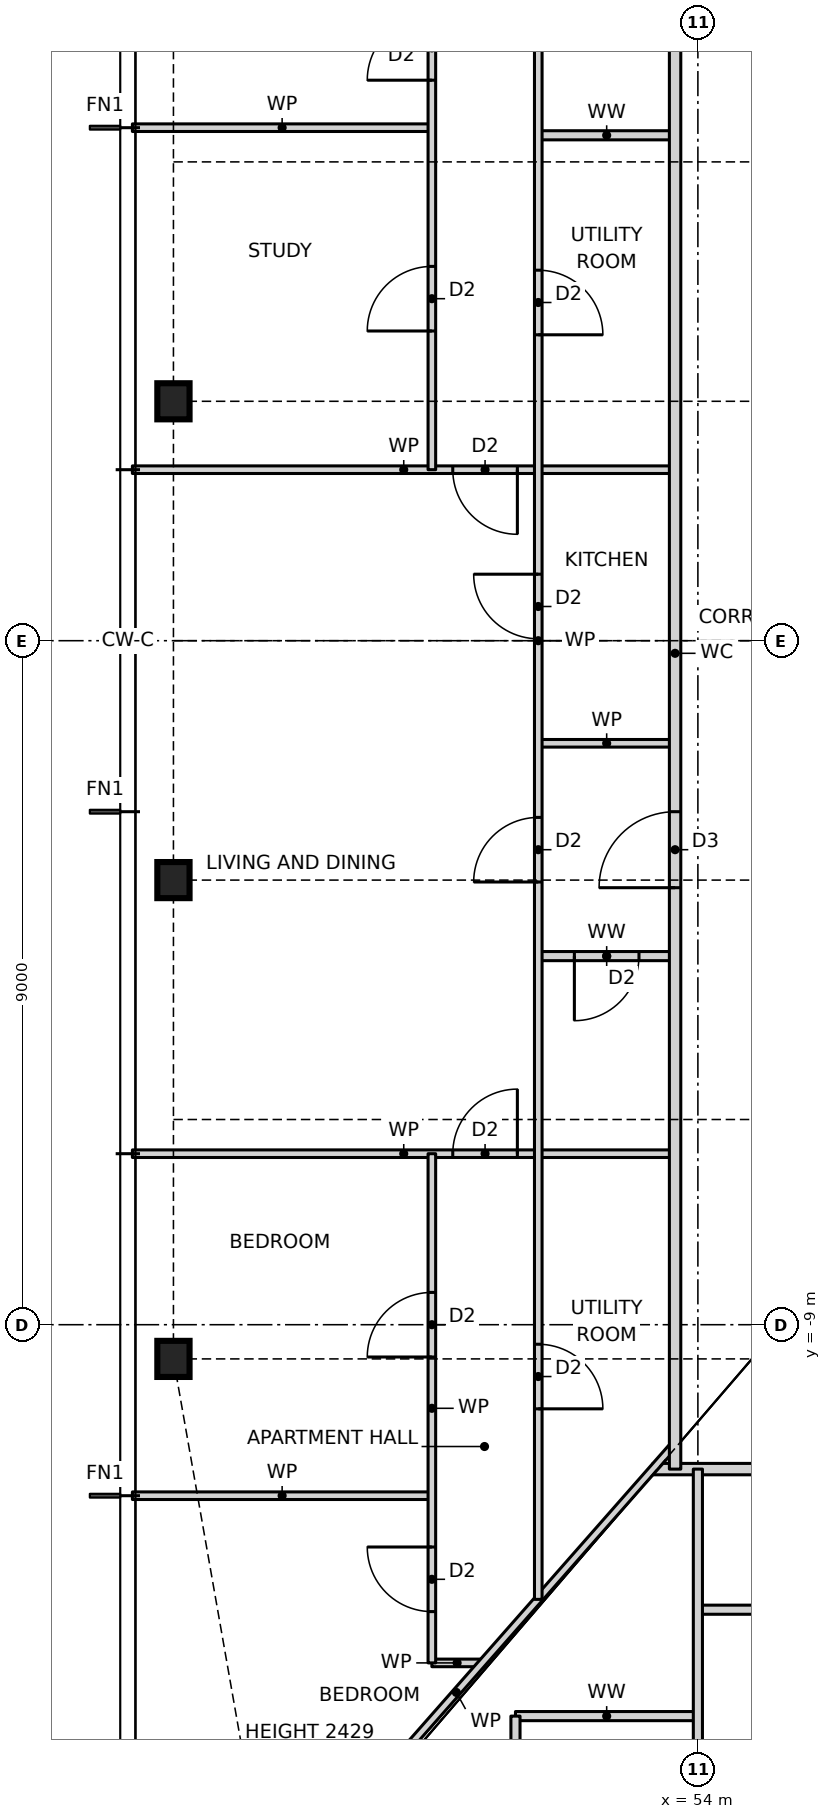
"""IFC4 building model, lengths in metres.
Left out: names, types, materials, properties, quantities, classifications, styles, units other than length and angle.
Written with IfcOpenShell. Run it as: python <this file> out.ifc"""

import sys

from ifc_helpers import new_model, si_unit, direction, frame, frame_2d, origin, origin_2d, place, context, subcontext, project, spatial, rectangle, i_section, extrude, element, fill, save


model = new_model("IFC4")
c1 = context("Model", 3, precision=1e-05, world=origin(), true_north=direction((0.0, 1.0)))
c2 = subcontext(c1, "Body", "Model", "MODEL_VIEW")
j1 = project(units=[si_unit("LENGTHUNIT", "METRE"), si_unit("PLANEANGLEUNIT", "RADIAN")], contexts=[c1])
p1 = place(None, origin())
s1 = spatial("IfcSite", under=j1, at=p1, CompositionType="ELEMENT")
p2 = place(p1, origin())
s2 = spatial("IfcBuilding", under=s1, at=p2, CompositionType="ELEMENT")
p3 = place(p2, frame((0.0, 0.0, 22.0)))
s3 = spatial("IfcBuildingStorey", under=s2, at=p3, CompositionType="ELEMENT", Elevation=22.0)
for number, where, z_axis, x_axis in (
    (1, (47.1, 3.15, 0.0), (0.0, 0.0, 1.0), (1.0, 0.0, 0.0)),
    (2, (47.1, -3.15, 0.0), (0.0, 0.0, 1.0), (1.0, 0.0, 0.0)),
    (3, (47.1, -9.45, 0.0), (0.0, 0.0, 1.0), (1.0, 0.0, 0.0)),
):
    element("IfcColumn", number, at=place(p3, frame(where, z_axis=z_axis, x_axis=x_axis)), inside=s3, PredefinedType="COLUMN", context=c2, shape_type="SweptSolid", body=[
        extrude(i_section(OverallWidth=0.424, OverallDepth=0.475, WebThickness=0.048, FlangeThickness=0.077, at=origin_2d()), origin(), (0.0, 0.0, 1.0), 3.5),
    ])
p4 = place(p3, frame((51.6, -14.15, 0.0), z_axis=(0.0, 0.0, 1.0), x_axis=(1.0, 0.0, 0.0)))
e4 = element("IfcWall", 4, at=p4, inside=s3, PredefinedType="PARTITIONING", context=c2, shape_type="SweptSolid", body=[
    extrude(rectangle(XDim=2.4, YDim=0.12, at=frame_2d((1.2, 0.0))), origin(), (0.0, 0.0, 1.0), 3.27),
])
p5 = place(p3, frame((50.5, -13.45, 0.0), z_axis=(0.0, 0.0, 1.0), x_axis=(1.0, 0.0, 0.0)))
e5 = element("IfcWall", 5, at=p5, inside=s3, PredefinedType="PARTITIONING", context=c2, shape_type="SweptSolid", body=[
    extrude(rectangle(XDim=0.664, YDim=0.1, at=frame_2d((0.332, 0.0))), origin(), (0.0, 0.0, 1.0), 3.27),
])
p6 = place(p3, frame((54.0, -12.75, 0.0), z_axis=(0.0, 0.0, 1.0), x_axis=(1.0, 0.0, 0.0)))
e6 = element("IfcWall", 6, at=p6, inside=s3, PredefinedType="PARTITIONING", context=c2, shape_type="SweptSolid", body=[
    extrude(rectangle(XDim=20.2, YDim=0.12, at=frame_2d((10.1, 0.0))), origin(), (0.0, 0.0, 1.0), 3.27),
])
p7 = place(p6, frame((1.375, 0.0, 0.0)))
e7 = element("IfcOpeningElement", 7, at=p7, cuts=e6, PredefinedType="OPENING", context=c2, shape_type="SweptSolid", body=[
    extrude(rectangle(XDim=0.85, YDim=2.1, at=frame_2d((0.425, 1.05))), frame((0.0, 0.07, 0.0), z_axis=(0.0, -1.0, 0.0), x_axis=(1.0, 0.0, 0.0)), (0.0, 0.0, 1.0), 0.14),
])
p8 = place(p6, frame((4.575, 0.0, 0.0)))
e8 = element("IfcOpeningElement", 8, at=p8, cuts=e6, PredefinedType="OPENING", context=c2, shape_type="SweptSolid", body=[
    extrude(rectangle(XDim=0.85, YDim=2.1, at=frame_2d((0.425, 1.05))), frame((0.0, 0.07, 0.0), z_axis=(0.0, -1.0, 0.0), x_axis=(1.0, 0.0, 0.0)), (0.0, 0.0, 1.0), 0.14),
])
p9 = place(p6, frame((10.725, 0.0, 0.0)))
e9 = element("IfcOpeningElement", 9, at=p9, cuts=e6, PredefinedType="OPENING", context=c2, shape_type="SweptSolid", body=[
    extrude(rectangle(XDim=0.85, YDim=2.1, at=frame_2d((0.425, 1.05))), frame((0.0, 0.07, 0.0), z_axis=(0.0, -1.0, 0.0), x_axis=(1.0, 0.0, 0.0)), (0.0, 0.0, 1.0), 0.14),
])
p10 = place(p6, frame((16.325, 0.0, 0.0)))
e10 = element("IfcOpeningElement", 10, at=p10, cuts=e6, PredefinedType="OPENING", context=c2, shape_type="SweptSolid", body=[
    extrude(rectangle(XDim=0.85, YDim=2.1, at=frame_2d((0.425, 1.05))), frame((0.0, 0.07, 0.0), z_axis=(0.0, -1.0, 0.0), x_axis=(1.0, 0.0, 0.0)), (0.0, 0.0, 1.0), 0.14),
])
p11 = place(p3, frame((46.56, -11.25, 0.0), z_axis=(0.0, 0.0, 1.0), x_axis=(1.0, 0.0, 0.0)))
e11 = element("IfcWall", 11, at=p11, inside=s3, PredefinedType="PARTITIONING", context=c2, shape_type="SweptSolid", body=[
    extrude(rectangle(XDim=3.94, YDim=0.1, at=frame_2d((1.97, 0.0))), origin(), (0.0, 0.0, 1.0), 3.27),
])
p12 = place(p3, frame((53.408, -10.9, 0.0), z_axis=(0.0, 0.0, 1.0), x_axis=(1.0, 0.0, 0.0)))
e12 = element("IfcWall", 12, at=p12, inside=s3, PredefinedType="PARTITIONING", context=c2, shape_type="SweptSolid", body=[
    extrude(rectangle(XDim=19.184, YDim=0.15, at=frame_2d((9.592, 0.0))), origin(), (0.0, 0.0, 1.0), 3.27),
])
p13 = place(p12, frame((5.092, 0.0, 0.0)))
e13 = element("IfcOpeningElement", 13, at=p13, cuts=e12, PredefinedType="OPENING", context=c2, shape_type="SweptSolid", body=[
    extrude(rectangle(XDim=1.0, YDim=2.1, at=frame_2d((0.5, 1.05))), frame((0.0, 0.085, 0.0), z_axis=(0.0, -1.0, 0.0), x_axis=(1.0, 0.0, 0.0)), (0.0, 0.0, 1.0), 0.17),
])
p14 = place(p3, frame((46.56, -6.75, 0.0), z_axis=(0.0, 0.0, 1.0), x_axis=(1.0, 0.0, 0.0)))
e14 = element("IfcWall", 14, at=p14, inside=s3, PredefinedType="PARTITIONING", context=c2, shape_type="SweptSolid", body=[
    extrude(rectangle(XDim=7.14, YDim=0.1, at=frame_2d((3.57, 0.0))), origin(), (0.0, 0.0, 1.0), 3.27),
])
p15 = place(p14, frame((4.215, 0.0, 0.0)))
e15 = element("IfcOpeningElement", 15, at=p15, cuts=e14, PredefinedType="OPENING", context=c2, shape_type="SweptSolid", body=[
    extrude(rectangle(XDim=0.85, YDim=2.1, at=frame_2d((0.425, 1.05))), frame((0.0, 0.06, 0.0), z_axis=(0.0, -1.0, 0.0), x_axis=(1.0, 0.0, 0.0)), (0.0, 0.0, 1.0), 0.12),
])
p16 = place(p3, frame((51.9, -4.15, 0.0), z_axis=(0.0, 0.0, 1.0), x_axis=(1.0, 0.0, 0.0)))
e16 = element("IfcWall", 16, at=p16, inside=s3, PredefinedType="PARTITIONING", context=c2, shape_type="SweptSolid", body=[
    extrude(rectangle(XDim=1.8, YDim=0.12, at=frame_2d((0.9, 0.0))), origin(), (0.0, 0.0, 1.0), 3.27),
])
p17 = place(p16, frame((0.475, 0.0, 0.0)))
e17 = element("IfcOpeningElement", 17, at=p17, cuts=e16, PredefinedType="OPENING", context=c2, shape_type="SweptSolid", body=[
    extrude(rectangle(XDim=0.85, YDim=2.1, at=frame_2d((0.425, 1.05))), frame((0.0, 0.07, 0.0), z_axis=(0.0, -1.0, 0.0), x_axis=(1.0, 0.0, 0.0)), (0.0, 0.0, 1.0), 0.14),
])
p18 = place(p3, frame((51.9, -1.35, 0.0), z_axis=(0.0, 0.0, 1.0), x_axis=(1.0, 0.0, 0.0)))
e18 = element("IfcWall", 18, at=p18, inside=s3, PredefinedType="PARTITIONING", context=c2, shape_type="SweptSolid", body=[
    extrude(rectangle(XDim=1.8, YDim=0.1, at=frame_2d((0.9, 0.0))), origin(), (0.0, 0.0, 1.0), 3.27),
])
p19 = place(p3, frame((46.56, 2.25, 0.0), z_axis=(0.0, 0.0, 1.0), x_axis=(1.0, 0.0, 0.0)))
e19 = element("IfcWall", 19, at=p19, inside=s3, PredefinedType="PARTITIONING", context=c2, shape_type="SweptSolid", body=[
    extrude(rectangle(XDim=7.14, YDim=0.1, at=frame_2d((3.57, 0.0))), origin(), (0.0, 0.0, 1.0), 3.27),
])
p20 = place(p19, frame((4.215, 0.0, 0.0)))
e20 = element("IfcOpeningElement", 20, at=p20, cuts=e19, PredefinedType="OPENING", context=c2, shape_type="SweptSolid", body=[
    extrude(rectangle(XDim=0.85, YDim=2.1, at=frame_2d((0.425, 1.05))), frame((0.0, 0.06, 0.0), z_axis=(0.0, -1.0, 0.0), x_axis=(1.0, 0.0, 0.0)), (0.0, 0.0, 1.0), 0.12),
])
p21 = place(p3, frame((51.9, 6.65, 0.0), z_axis=(0.0, 0.0, 1.0), x_axis=(1.0, 0.0, 0.0)))
e21 = element("IfcWall", 21, at=p21, inside=s3, PredefinedType="PARTITIONING", context=c2, shape_type="SweptSolid", body=[
    extrude(rectangle(XDim=1.8, YDim=0.12, at=frame_2d((0.9, 0.0))), origin(), (0.0, 0.0, 1.0), 3.27),
])
p22 = place(p3, frame((46.56, 6.75, 0.0), z_axis=(0.0, 0.0, 1.0), x_axis=(1.0, 0.0, 0.0)))
e22 = element("IfcWall", 22, at=p22, inside=s3, PredefinedType="PARTITIONING", context=c2, shape_type="SweptSolid", body=[
    extrude(rectangle(XDim=3.94, YDim=0.1, at=frame_2d((1.97, 0.0))), origin(), (0.0, 0.0, 1.0), 3.27),
])
p23 = place(p3, frame((47.944, -17.109, 0.0), z_axis=(0.0, 0.0, 1.0), x_axis=(0.660612734851, 0.750726857487, 0.0)))
e23 = element("IfcWall", 23, at=p23, inside=s3, PredefinedType="PARTITIONING", context=c2, shape_type="SweptSolid", body=[
    extrude(rectangle(XDim=8.713, YDim=0.1, at=frame_2d((4.356, 0.0))), origin(), (0.0, 0.0, 1.0), 2.429),
])
p24 = place(p3, frame((54.0, -18.69, 0.0), z_axis=(0.0, 0.0, 1.0), x_axis=(0.0, 1.0, 0.0)))
e24 = element("IfcWall", 24, at=p24, inside=s3, PredefinedType="PARTITIONING", context=c2, shape_type="SweptSolid", body=[
    extrude(rectangle(XDim=7.79, YDim=0.12, at=frame_2d((3.895, 0.0))), origin(), (0.0, 0.0, 1.0), 3.27),
])
p25 = place(p24, frame((0.99, 0.0, 0.0)))
e25 = element("IfcOpeningElement", 25, at=p25, cuts=e24, PredefinedType="OPENING", context=c2, shape_type="SweptSolid", body=[
    extrude(rectangle(XDim=0.85, YDim=2.1, at=frame_2d((0.425, 1.05))), frame((0.0, 0.07, 0.0), z_axis=(0.0, -1.0, 0.0), x_axis=(1.0, 0.0, 0.0)), (0.0, 0.0, 1.0), 0.14),
])
p26 = place(p3, frame((53.7, -10.9, 0.0), z_axis=(0.0, 0.0, 1.0), x_axis=(0.0, 1.0, 0.0)))
e26 = element("IfcWall", 26, at=p26, inside=s3, PredefinedType="PARTITIONING", context=c2, shape_type="SweptSolid", body=[
    extrude(rectangle(XDim=21.468, YDim=0.15, at=frame_2d((10.734, 0.0))), origin(), (0.0, 0.0, 1.0), 3.27),
])
p27 = place(p26, frame((7.65, 0.0, 0.0)))
e27 = element("IfcOpeningElement", 27, at=p27, cuts=e26, PredefinedType="OPENING", context=c2, shape_type="SweptSolid", body=[
    extrude(rectangle(XDim=1.0, YDim=2.1, at=frame_2d((0.5, 1.05))), frame((0.0, 0.085, 0.0), z_axis=(0.0, -1.0, 0.0), x_axis=(1.0, 0.0, 0.0)), (0.0, 0.0, 1.0), 0.17),
])
p28 = place(p3, frame((51.9, -12.614, 0.0), z_axis=(0.0, 0.0, 1.0), x_axis=(0.0, 1.0, 0.0)))
e28 = element("IfcWall", 28, at=p28, inside=s3, PredefinedType="PARTITIONING", context=c2, shape_type="SweptSolid", body=[
    extrude(rectangle(XDim=25.228, YDim=0.1, at=frame_2d((12.614, 0.0))), origin(), (0.0, 0.0, 1.0), 3.27),
])
p29 = place(p28, frame((12.639, 0.0, 0.0)))
e29 = element("IfcOpeningElement", 29, at=p29, cuts=e28, PredefinedType="OPENING", context=c2, shape_type="SweptSolid", body=[
    extrude(rectangle(XDim=0.85, YDim=2.1, at=frame_2d((0.425, 1.05))), frame((0.0, 0.06, 0.0), z_axis=(0.0, -1.0, 0.0), x_axis=(1.0, 0.0, 0.0)), (0.0, 0.0, 1.0), 0.12),
])
p30 = place(p28, frame((9.439, 0.0, 0.0)))
e30 = element("IfcOpeningElement", 30, at=p30, cuts=e28, PredefinedType="OPENING", context=c2, shape_type="SweptSolid", body=[
    extrude(rectangle(XDim=0.85, YDim=2.1, at=frame_2d((0.425, 1.05))), frame((0.0, 0.06, 0.0), z_axis=(0.0, -1.0, 0.0), x_axis=(1.0, 0.0, 0.0)), (0.0, 0.0, 1.0), 0.12),
])
p31 = place(p28, frame((16.639, 0.0, 0.0)))
e31 = element("IfcOpeningElement", 31, at=p31, cuts=e28, PredefinedType="OPENING", context=c2, shape_type="SweptSolid", body=[
    extrude(rectangle(XDim=0.85, YDim=2.1, at=frame_2d((0.425, 1.05))), frame((0.0, 0.06, 0.0), z_axis=(0.0, -1.0, 0.0), x_axis=(1.0, 0.0, 0.0)), (0.0, 0.0, 1.0), 0.12),
])
p32 = place(p28, frame((21.821, 0.0, 0.0)))
e32 = element("IfcOpeningElement", 32, at=p32, cuts=e28, PredefinedType="OPENING", context=c2, shape_type="SweptSolid", body=[
    extrude(rectangle(XDim=0.85, YDim=2.1, at=frame_2d((0.425, 1.05))), frame((0.0, 0.06, 0.0), z_axis=(0.0, -1.0, 0.0), x_axis=(1.0, 0.0, 0.0)), (0.0, 0.0, 1.0), 0.12),
])
p33 = place(p28, frame((2.507, 0.0, 0.0)))
e33 = element("IfcOpeningElement", 33, at=p33, cuts=e28, PredefinedType="OPENING", context=c2, shape_type="SweptSolid", body=[
    extrude(rectangle(XDim=0.85, YDim=2.1, at=frame_2d((0.425, 1.05))), frame((0.0, 0.06, 0.0), z_axis=(0.0, -1.0, 0.0), x_axis=(1.0, 0.0, 0.0)), (0.0, 0.0, 1.0), 0.12),
])
p34 = place(p3, frame((51.6, -16.75, 0.0), z_axis=(0.0, 0.0, 1.0), x_axis=(0.0, 1.0, 0.0)))
e34 = element("IfcWall", 34, at=p34, inside=s3, PredefinedType="PARTITIONING", context=c2, shape_type="SweptSolid", body=[
    extrude(rectangle(XDim=2.6, YDim=0.12, at=frame_2d((1.3, 0.0))), origin(), (0.0, 0.0, 1.0), 3.27),
])
p35 = place(p34, frame((0.875, 0.0, 0.0)))
e35 = element("IfcOpeningElement", 35, at=p35, cuts=e34, PredefinedType="OPENING", context=c2, shape_type="SweptSolid", body=[
    extrude(rectangle(XDim=0.85, YDim=2.1, at=frame_2d((0.425, 1.05))), frame((0.0, 0.07, 0.0), z_axis=(0.0, -1.0, 0.0), x_axis=(1.0, 0.0, 0.0)), (0.0, 0.0, 1.0), 0.14),
])
p36 = place(p3, frame((50.5, -13.45, 0.0), z_axis=(0.0, 0.0, 1.0), x_axis=(0.0, 1.0, 0.0)))
e36 = element("IfcWall", 36, at=p36, inside=s3, PredefinedType="PARTITIONING", context=c2, shape_type="SweptSolid", body=[
    extrude(rectangle(XDim=6.7, YDim=0.1, at=frame_2d((3.35, 0.0))), origin(), (0.0, 0.0, 1.0), 3.27),
])
p37 = place(p36, frame((4.025, 0.0, 0.0)))
e37 = element("IfcOpeningElement", 37, at=p37, cuts=e36, PredefinedType="OPENING", context=c2, shape_type="SweptSolid", body=[
    extrude(rectangle(XDim=0.85, YDim=2.1, at=frame_2d((0.425, 1.05))), frame((0.0, 0.06, 0.0), z_axis=(0.0, -1.0, 0.0), x_axis=(1.0, 0.0, 0.0)), (0.0, 0.0, 1.0), 0.12),
])
p38 = place(p36, frame((0.675, 0.0, 0.0)))
e38 = element("IfcOpeningElement", 38, at=p38, cuts=e36, PredefinedType="OPENING", context=c2, shape_type="SweptSolid", body=[
    extrude(rectangle(XDim=0.85, YDim=2.1, at=frame_2d((0.425, 1.05))), frame((0.0, 0.06, 0.0), z_axis=(0.0, -1.0, 0.0), x_axis=(1.0, 0.0, 0.0)), (0.0, 0.0, 1.0), 0.12),
])
p39 = place(p3, frame((50.5, 2.25, 0.0), z_axis=(0.0, 0.0, 1.0), x_axis=(0.0, 1.0, 0.0)))
e39 = element("IfcWall", 39, at=p39, inside=s3, PredefinedType="PARTITIONING", context=c2, shape_type="SweptSolid", body=[
    extrude(rectangle(XDim=11.2, YDim=0.1, at=frame_2d((5.6, 0.0))), origin(), (0.0, 0.0, 1.0), 3.27),
])
p40 = place(p39, frame((1.825, 0.0, 0.0)))
e40 = element("IfcOpeningElement", 40, at=p40, cuts=e39, PredefinedType="OPENING", context=c2, shape_type="SweptSolid", body=[
    extrude(rectangle(XDim=0.85, YDim=2.1, at=frame_2d((0.425, 1.05))), frame((0.0, 0.06, 0.0), z_axis=(0.0, -1.0, 0.0), x_axis=(1.0, 0.0, 0.0)), (0.0, 0.0, 1.0), 0.12),
])
p41 = place(p39, frame((5.125, 0.0, 0.0)))
e41 = element("IfcOpeningElement", 41, at=p41, cuts=e39, PredefinedType="OPENING", context=c2, shape_type="SweptSolid", body=[
    extrude(rectangle(XDim=0.85, YDim=2.1, at=frame_2d((0.425, 1.05))), frame((0.0, 0.06, 0.0), z_axis=(0.0, -1.0, 0.0), x_axis=(1.0, 0.0, 0.0)), (0.0, 0.0, 1.0), 0.12),
])
p42 = place(p39, frame((9.675, 0.0, 0.0)))
e42 = element("IfcOpeningElement", 42, at=p42, cuts=e39, PredefinedType="OPENING", context=c2, shape_type="SweptSolid", body=[
    extrude(rectangle(XDim=0.85, YDim=2.1, at=frame_2d((0.425, 1.05))), frame((0.0, 0.06, 0.0), z_axis=(0.0, -1.0, 0.0), x_axis=(1.0, 0.0, 0.0)), (0.0, 0.0, 1.0), 0.12),
])
p43 = place(p29, origin())
e43 = element("IfcDoor", 43, at=p43, inside=s3, OperationType="SINGLE_SWING_RIGHT", PredefinedType="DOOR", context=c2, shape_type="SweptSolid", body=[
    extrude(rectangle(XDim=0.85, YDim=2.1, at=frame_2d((0.425, 1.05))), frame((0.0, 0.025, 0.0), z_axis=(0.0, -1.0, 0.0), x_axis=(1.0, 0.0, 0.0)), (0.0, 0.0, 1.0), 0.05),
])
fill(e29, e43)
p44 = place(p27, origin())
e44 = element("IfcDoor", 44, at=p44, inside=s3, OperationType="SINGLE_SWING_LEFT", PredefinedType="DOOR", context=c2, shape_type="SweptSolid", body=[
    extrude(rectangle(XDim=1.0, YDim=2.1, at=frame_2d((0.5, 1.05))), frame((0.0, 0.025, 0.0), z_axis=(0.0, -1.0, 0.0), x_axis=(1.0, 0.0, 0.0)), (0.0, 0.0, 1.0), 0.05),
])
fill(e27, e44)
p45 = place(p30, origin())
e45 = element("IfcDoor", 45, at=p45, inside=s3, OperationType="SINGLE_SWING_LEFT", PredefinedType="DOOR", context=c2, shape_type="SweptSolid", body=[
    extrude(rectangle(XDim=0.85, YDim=2.1, at=frame_2d((0.425, 1.05))), frame((0.0, 0.025, 0.0), z_axis=(0.0, -1.0, 0.0), x_axis=(1.0, 0.0, 0.0)), (0.0, 0.0, 1.0), 0.05),
])
fill(e30, e45)
p46 = place(p17, frame((0.85, 0.0, 0.0), z_axis=(0.0, 0.0, 1.0), x_axis=(-1.0, 0.0, 0.0)))
e46 = element("IfcDoor", 46, at=p46, inside=s3, OperationType="SINGLE_SWING_RIGHT", PredefinedType="DOOR", context=c2, shape_type="SweptSolid", body=[
    extrude(rectangle(XDim=0.85, YDim=2.1, at=frame_2d((0.425, 1.05))), frame((0.0, 0.025, 0.0), z_axis=(0.0, -1.0, 0.0), x_axis=(1.0, 0.0, 0.0)), (0.0, 0.0, 1.0), 0.05),
])
fill(e17, e46)
p47 = place(p20, frame((0.85, 0.0, 0.0), z_axis=(0.0, 0.0, 1.0), x_axis=(-1.0, 0.0, 0.0)))
e47 = element("IfcDoor", 47, at=p47, inside=s3, OperationType="SINGLE_SWING_LEFT", PredefinedType="DOOR", context=c2, shape_type="SweptSolid", body=[
    extrude(rectangle(XDim=0.85, YDim=2.1, at=frame_2d((0.425, 1.05))), frame((0.0, 0.025, 0.0), z_axis=(0.0, -1.0, 0.0), x_axis=(1.0, 0.0, 0.0)), (0.0, 0.0, 1.0), 0.05),
])
fill(e20, e47)
p48 = place(p40, origin())
e48 = element("IfcDoor", 48, at=p48, inside=s3, OperationType="SINGLE_SWING_LEFT", PredefinedType="DOOR", context=c2, shape_type="SweptSolid", body=[
    extrude(rectangle(XDim=0.85, YDim=2.1, at=frame_2d((0.425, 1.05))), frame((0.0, 0.025, 0.0), z_axis=(0.0, -1.0, 0.0), x_axis=(1.0, 0.0, 0.0)), (0.0, 0.0, 1.0), 0.05),
])
fill(e40, e48)
p49 = place(p41, origin())
e49 = element("IfcDoor", 49, at=p49, inside=s3, OperationType="SINGLE_SWING_LEFT", PredefinedType="DOOR", context=c2, shape_type="SweptSolid", body=[
    extrude(rectangle(XDim=0.85, YDim=2.1, at=frame_2d((0.425, 1.05))), frame((0.0, 0.025, 0.0), z_axis=(0.0, -1.0, 0.0), x_axis=(1.0, 0.0, 0.0)), (0.0, 0.0, 1.0), 0.05),
])
fill(e41, e49)
p50 = place(p31, frame((0.85, 0.0, 0.0), z_axis=(0.0, 0.0, 1.0), x_axis=(-1.0, 0.0, 0.0)))
e50 = element("IfcDoor", 50, at=p50, inside=s3, OperationType="SINGLE_SWING_RIGHT", PredefinedType="DOOR", context=c2, shape_type="SweptSolid", body=[
    extrude(rectangle(XDim=0.85, YDim=2.1, at=frame_2d((0.425, 1.05))), frame((0.0, 0.025, 0.0), z_axis=(0.0, -1.0, 0.0), x_axis=(1.0, 0.0, 0.0)), (0.0, 0.0, 1.0), 0.05),
])
fill(e31, e50)
p51 = place(p15, origin())
e51 = element("IfcDoor", 51, at=p51, inside=s3, OperationType="SINGLE_SWING_RIGHT", PredefinedType="DOOR", context=c2, shape_type="SweptSolid", body=[
    extrude(rectangle(XDim=0.85, YDim=2.1, at=frame_2d((0.425, 1.05))), frame((0.0, 0.025, 0.0), z_axis=(0.0, -1.0, 0.0), x_axis=(1.0, 0.0, 0.0)), (0.0, 0.0, 1.0), 0.05),
])
fill(e15, e51)
p52 = place(p37, origin())
e52 = element("IfcDoor", 52, at=p52, inside=s3, OperationType="SINGLE_SWING_LEFT", PredefinedType="DOOR", context=c2, shape_type="SweptSolid", body=[
    extrude(rectangle(XDim=0.85, YDim=2.1, at=frame_2d((0.425, 1.05))), frame((0.0, 0.025, 0.0), z_axis=(0.0, -1.0, 0.0), x_axis=(1.0, 0.0, 0.0)), (0.0, 0.0, 1.0), 0.05),
])
fill(e37, e52)
p53 = place(p38, origin())
e53 = element("IfcDoor", 53, at=p53, inside=s3, OperationType="SINGLE_SWING_RIGHT", PredefinedType="DOOR", context=c2, shape_type="SweptSolid", body=[
    extrude(rectangle(XDim=0.85, YDim=2.1, at=frame_2d((0.425, 1.05))), frame((0.0, 0.025, 0.0), z_axis=(0.0, -1.0, 0.0), x_axis=(1.0, 0.0, 0.0)), (0.0, 0.0, 1.0), 0.05),
])
fill(e38, e53)
p54 = place(p33, frame((0.85, 0.0, 0.0), z_axis=(0.0, 0.0, 1.0), x_axis=(-1.0, 0.0, 0.0)))
e54 = element("IfcDoor", 54, at=p54, inside=s3, OperationType="SINGLE_SWING_RIGHT", PredefinedType="DOOR", context=c2, shape_type="SweptSolid", body=[
    extrude(rectangle(XDim=0.85, YDim=2.1, at=frame_2d((0.425, 1.05))), frame((0.0, 0.025, 0.0), z_axis=(0.0, -1.0, 0.0), x_axis=(1.0, 0.0, 0.0)), (0.0, 0.0, 1.0), 0.05),
])
fill(e33, e54)
save(model, sys.argv[1])
